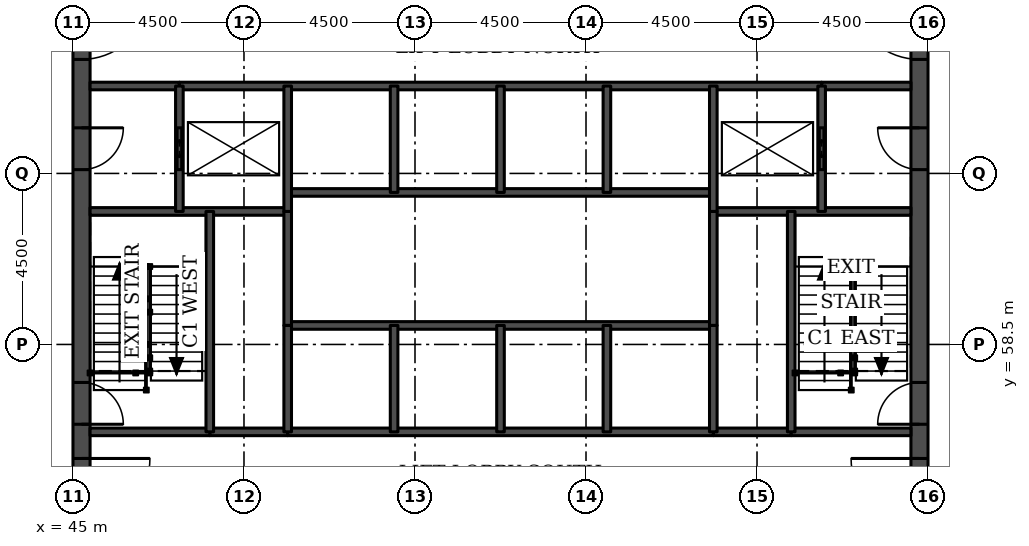
"""IFC4 building model, lengths in metres.
Left out: names, types, materials, properties, quantities, classifications, styles, units other than length and angle.
Written with IfcOpenShell. Run it as: python <this file> out.ifc"""

import sys

from ifc_helpers import new_model, si_unit, direction, frame, frame_2d, origin, place, context, subcontext, project, spatial, rectangle, extrude, element, fill, save


model = new_model("IFC4")
c1 = context("Model", 3, precision=1e-05, world=origin(), true_north=direction((0.0, 1.0)))
c2 = subcontext(c1, "Body", "Model", "MODEL_VIEW")
j1 = project(units=[si_unit("LENGTHUNIT", "METRE"), si_unit("PLANEANGLEUNIT", "RADIAN")], contexts=[c1])
p1 = place(None, origin())
s1 = spatial("IfcSite", under=j1, at=p1, CompositionType="ELEMENT")
p2 = place(p1, origin())
s2 = spatial("IfcBuilding", under=s1, at=p2, CompositionType="ELEMENT")
p3 = place(p2, frame((0.0, 0.0, 93.7)))
s3 = spatial("IfcBuildingStorey", under=s2, at=p3, CompositionType="ELEMENT", Elevation=93.7)
p4 = place(p3, frame((45.225, 49.5, 0.0), z_axis=(0.0, 0.0, 1.0), x_axis=(0.0, 1.0, 0.0)))
e1 = element("IfcWall", 1, at=p4, inside=s3, PredefinedType="SHEAR", context=c2, shape_type="SweptSolid", body=[
    extrude(rectangle(XDim=22.5, YDim=0.45, at=frame_2d((11.25, 0.0))), origin(), (0.0, 0.0, 1.0), 3.7),
])
p5 = place(p4, frame((4.2, 0.0, 0.0)))
e2 = element("IfcOpeningElement", 2, at=p5, cuts=e1, PredefinedType="OPENING", context=c2, shape_type="SweptSolid", body=[
    extrude(rectangle(XDim=1.8, YDim=2.1, at=frame_2d((0.9, 1.05))), frame((0.0, 0.235, 0.0), z_axis=(0.0, -1.0, 0.0), x_axis=(1.0, 0.0, 0.0)), (0.0, 0.0, 1.0), 0.47),
])
p6 = place(p4, frame((6.9, 0.0, 0.0)))
e3 = element("IfcOpeningElement", 3, at=p6, cuts=e1, PredefinedType="OPENING", context=c2, shape_type="SweptSolid", body=[
    extrude(rectangle(XDim=1.1, YDim=2.1, at=frame_2d((0.55, 1.05))), frame((0.0, 0.235, 0.0), z_axis=(0.0, -1.0, 0.0), x_axis=(1.0, 0.0, 0.0)), (0.0, 0.0, 1.0), 0.47),
])
p7 = place(p4, frame((13.6, 0.0, 0.0)))
e4 = element("IfcOpeningElement", 4, at=p7, cuts=e1, PredefinedType="OPENING", context=c2, shape_type="SweptSolid", body=[
    extrude(rectangle(XDim=1.1, YDim=2.1, at=frame_2d((0.55, 1.05))), frame((0.0, 0.235, 0.0), z_axis=(0.0, -1.0, 0.0), x_axis=(1.0, 0.0, 0.0)), (0.0, 0.0, 1.0), 0.47),
])
p8 = place(p4, frame((16.5, 0.0, 0.0)))
e5 = element("IfcOpeningElement", 5, at=p8, cuts=e1, PredefinedType="OPENING", context=c2, shape_type="SweptSolid", body=[
    extrude(rectangle(XDim=1.8, YDim=2.1, at=frame_2d((0.9, 1.05))), frame((0.0, 0.235, 0.0), z_axis=(0.0, -1.0, 0.0), x_axis=(1.0, 0.0, 0.0)), (0.0, 0.0, 1.0), 0.47),
])
p9 = place(p3, frame((67.275, 49.5, 0.0), z_axis=(0.0, 0.0, 1.0), x_axis=(0.0, 1.0, 0.0)))
e6 = element("IfcWall", 6, at=p9, inside=s3, PredefinedType="SHEAR", context=c2, shape_type="SweptSolid", body=[
    extrude(rectangle(XDim=22.5, YDim=0.45, at=frame_2d((11.25, 0.0))), origin(), (0.0, 0.0, 1.0), 3.7),
])
p10 = place(p9, frame((4.2, 0.0, 0.0)))
e7 = element("IfcOpeningElement", 7, at=p10, cuts=e6, PredefinedType="OPENING", context=c2, shape_type="SweptSolid", body=[
    extrude(rectangle(XDim=1.8, YDim=2.1, at=frame_2d((0.9, 1.05))), frame((0.0, 0.235, 0.0), z_axis=(0.0, -1.0, 0.0), x_axis=(1.0, 0.0, 0.0)), (0.0, 0.0, 1.0), 0.47),
])
p11 = place(p9, frame((6.9, 0.0, 0.0)))
e8 = element("IfcOpeningElement", 8, at=p11, cuts=e6, PredefinedType="OPENING", context=c2, shape_type="SweptSolid", body=[
    extrude(rectangle(XDim=1.1, YDim=2.1, at=frame_2d((0.55, 1.05))), frame((0.0, 0.235, 0.0), z_axis=(0.0, -1.0, 0.0), x_axis=(1.0, 0.0, 0.0)), (0.0, 0.0, 1.0), 0.47),
])
p12 = place(p9, frame((13.6, 0.0, 0.0)))
e9 = element("IfcOpeningElement", 9, at=p12, cuts=e6, PredefinedType="OPENING", context=c2, shape_type="SweptSolid", body=[
    extrude(rectangle(XDim=1.1, YDim=2.1, at=frame_2d((0.55, 1.05))), frame((0.0, 0.235, 0.0), z_axis=(0.0, -1.0, 0.0), x_axis=(1.0, 0.0, 0.0)), (0.0, 0.0, 1.0), 0.47),
])
p13 = place(p9, frame((16.5, 0.0, 0.0)))
e10 = element("IfcOpeningElement", 10, at=p13, cuts=e6, PredefinedType="OPENING", context=c2, shape_type="SweptSolid", body=[
    extrude(rectangle(XDim=1.8, YDim=2.1, at=frame_2d((0.9, 1.05))), frame((0.0, 0.235, 0.0), z_axis=(0.0, -1.0, 0.0), x_axis=(1.0, 0.0, 0.0)), (0.0, 0.0, 1.0), 0.47),
])
for number, where, z_axis, x_axis in (
    (11, (48.6, 56.2, 0.0), (0.0, 0.0, 1.0), (1.0, 0.0, 0.0)),
    (12, (61.85, 56.2, 0.0), (0.0, 0.0, 1.0), (1.0, 0.0, 0.0)),
):
    element("IfcWall", number, at=place(p3, frame(where, z_axis=z_axis, x_axis=x_axis)), inside=s3, PredefinedType="SOLIDWALL", context=c2, shape_type="SweptSolid", body=[
        extrude(rectangle(XDim=2.05, YDim=0.2, at=frame_2d((1.025, 0.0))), origin(), (0.0, 0.0, 1.0), 3.55),
    ])
p14 = place(p3, frame((45.45, 56.2, 0.0), z_axis=(0.0, 0.0, 1.0), x_axis=(1.0, 0.0, 0.0)))
e13 = element("IfcWall", 13, at=p14, inside=s3, PredefinedType="SOLIDWALL", context=c2, shape_type="SweptSolid", body=[
    extrude(rectangle(XDim=3.15, YDim=0.2, at=frame_2d((1.575, 0.0))), origin(), (0.0, 0.0, 1.0), 3.55),
])
p15 = place(p3, frame((50.65, 56.2, 0.0), z_axis=(0.0, 0.0, 1.0), x_axis=(1.0, 0.0, 0.0)))
e14 = element("IfcWall", 14, at=p15, inside=s3, PredefinedType="SOLIDWALL", context=c2, shape_type="SweptSolid", body=[
    extrude(rectangle(XDim=11.2, YDim=0.2, at=frame_2d((5.6, 0.0))), origin(), (0.0, 0.0, 1.0), 3.55),
])
p16 = place(p3, frame((63.9, 56.2, 0.0), z_axis=(0.0, 0.0, 1.0), x_axis=(1.0, 0.0, 0.0)))
e15 = element("IfcWall", 15, at=p16, inside=s3, PredefinedType="SOLIDWALL", context=c2, shape_type="SweptSolid", body=[
    extrude(rectangle(XDim=3.15, YDim=0.2, at=frame_2d((1.575, 0.0))), origin(), (0.0, 0.0, 1.0), 3.55),
])
p17 = place(p3, frame((50.65, 59.0, 0.0), z_axis=(0.0, 0.0, 1.0), x_axis=(1.0, 0.0, 0.0)))
e16 = element("IfcWall", 16, at=p17, inside=s3, PredefinedType="SOLIDWALL", context=c2, shape_type="SweptSolid", body=[
    extrude(rectangle(XDim=11.2, YDim=0.2, at=frame_2d((5.6, 0.0))), origin(), (0.0, 0.0, 1.0), 3.7),
])
for number, where, z_axis, x_axis in (
    (17, (45.45, 62.0, 0.0), (0.0, 0.0, 1.0), (1.0, 0.0, 0.0)),
    (18, (61.85, 62.0, 0.0), (0.0, 0.0, 1.0), (1.0, 0.0, 0.0)),
):
    element("IfcWall", number, at=place(p3, frame(where, z_axis=z_axis, x_axis=x_axis)), inside=s3, PredefinedType="SOLIDWALL", context=c2, shape_type="SweptSolid", body=[
        extrude(rectangle(XDim=5.2, YDim=0.2, at=frame_2d((2.6, 0.0))), origin(), (0.0, 0.0, 1.0), 3.55),
    ])
p18 = place(p3, frame((50.65, 62.5, 0.0), z_axis=(0.0, 0.0, 1.0), x_axis=(1.0, 0.0, 0.0)))
e19 = element("IfcWall", 19, at=p18, inside=s3, PredefinedType="SOLIDWALL", context=c2, shape_type="SweptSolid", body=[
    extrude(rectangle(XDim=11.2, YDim=0.2, at=frame_2d((5.6, 0.0))), origin(), (0.0, 0.0, 1.0), 3.7),
])
for number, where, z_axis, x_axis in (
    (20, (45.45, 65.3, 0.0), (0.0, 0.0, 1.0), (1.0, 0.0, 0.0)),
    (21, (64.7, 65.3, 0.0), (0.0, 0.0, 1.0), (1.0, 0.0, 0.0)),
):
    element("IfcWall", number, at=place(p3, frame(where, z_axis=z_axis, x_axis=x_axis)), inside=s3, PredefinedType="SOLIDWALL", context=c2, shape_type="SweptSolid", body=[
        extrude(rectangle(XDim=2.35, YDim=0.2, at=frame_2d((1.175, 0.0))), origin(), (0.0, 0.0, 1.0), 3.55),
    ])
p19 = place(p3, frame((47.8, 65.3, 0.0), z_axis=(0.0, 0.0, 1.0), x_axis=(1.0, 0.0, 0.0)))
e22 = element("IfcWall", 22, at=p19, inside=s3, PredefinedType="SOLIDWALL", context=c2, shape_type="SweptSolid", body=[
    extrude(rectangle(XDim=16.9, YDim=0.2, at=frame_2d((8.45, 0.0))), origin(), (0.0, 0.0, 1.0), 3.55),
])
p20 = place(p3, frame((47.8, 62.0, 0.0), z_axis=(0.0, 0.0, 1.0), x_axis=(0.0, 1.0, 0.0)))
e23 = element("IfcWall", 23, at=p20, inside=s3, PredefinedType="SOLIDWALL", context=c2, shape_type="SweptSolid", body=[
    extrude(rectangle(XDim=3.3, YDim=0.2, at=frame_2d((1.65, 0.0))), origin(), (0.0, 0.0, 1.0), 3.55),
])
p21 = place(p20, frame((1.1, 0.0, 0.0)))
e24 = element("IfcOpeningElement", 24, at=p21, cuts=e23, PredefinedType="OPENING", context=c2, shape_type="SweptSolid", body=[
    extrude(rectangle(XDim=1.1, YDim=2.1, at=frame_2d((0.55, 1.05))), frame((0.0, 0.11, 0.0), z_axis=(0.0, -1.0, 0.0), x_axis=(1.0, 0.0, 0.0)), (0.0, 0.0, 1.0), 0.22),
])
p22 = place(p3, frame((48.6, 56.2, 0.0), z_axis=(0.0, 0.0, 1.0), x_axis=(0.0, 1.0, 0.0)))
e25 = element("IfcWall", 25, at=p22, inside=s3, PredefinedType="SOLIDWALL", context=c2, shape_type="SweptSolid", body=[
    extrude(rectangle(XDim=5.8, YDim=0.2, at=frame_2d((2.9, 0.0))), origin(), (0.0, 0.0, 1.0), 3.55),
])
p23 = place(p3, frame((50.65, 59.0, 0.0), z_axis=(0.0, 0.0, 1.0), x_axis=(0.0, 1.0, 0.0)))
e26 = element("IfcWall", 26, at=p23, inside=s3, PredefinedType="SOLIDWALL", context=c2, shape_type="SweptSolid", body=[
    extrude(rectangle(XDim=3.0, YDim=0.2, at=frame_2d((1.5, 0.0))), origin(), (0.0, 0.0, 1.0), 3.7),
])
p24 = place(p3, frame((50.65, 56.2, 0.0), z_axis=(0.0, 0.0, 1.0), x_axis=(0.0, 1.0, 0.0)))
e27 = element("IfcWall", 27, at=p24, inside=s3, PredefinedType="SOLIDWALL", context=c2, shape_type="SweptSolid", body=[
    extrude(rectangle(XDim=2.8, YDim=0.2, at=frame_2d((1.4, 0.0))), origin(), (0.0, 0.0, 1.0), 3.55),
])
p25 = place(p3, frame((50.65, 62.0, 0.0), z_axis=(0.0, 0.0, 1.0), x_axis=(0.0, 1.0, 0.0)))
e28 = element("IfcWall", 28, at=p25, inside=s3, PredefinedType="SOLIDWALL", context=c2, shape_type="SweptSolid", body=[
    extrude(rectangle(XDim=3.3, YDim=0.2, at=frame_2d((1.65, 0.0))), origin(), (0.0, 0.0, 1.0), 3.55),
])
for number, where, z_axis, x_axis in (
    (29, (53.45, 56.2, 0.0), (0.0, 0.0, 1.0), (0.0, 1.0, 0.0)),
    (30, (53.45, 62.5, 0.0), (0.0, 0.0, 1.0), (0.0, 1.0, 0.0)),
    (31, (56.25, 56.2, 0.0), (0.0, 0.0, 1.0), (0.0, 1.0, 0.0)),
    (32, (56.25, 62.5, 0.0), (0.0, 0.0, 1.0), (0.0, 1.0, 0.0)),
    (33, (59.05, 56.2, 0.0), (0.0, 0.0, 1.0), (0.0, 1.0, 0.0)),
    (34, (59.05, 62.5, 0.0), (0.0, 0.0, 1.0), (0.0, 1.0, 0.0)),
):
    element("IfcWall", number, at=place(p3, frame(where, z_axis=z_axis, x_axis=x_axis)), inside=s3, PredefinedType="SOLIDWALL", context=c2, shape_type="SweptSolid", body=[
        extrude(rectangle(XDim=2.8, YDim=0.2, at=frame_2d((1.4, 0.0))), origin(), (0.0, 0.0, 1.0), 3.55),
    ])
p26 = place(p3, frame((61.85, 59.0, 0.0), z_axis=(0.0, 0.0, 1.0), x_axis=(0.0, 1.0, 0.0)))
e35 = element("IfcWall", 35, at=p26, inside=s3, PredefinedType="SOLIDWALL", context=c2, shape_type="SweptSolid", body=[
    extrude(rectangle(XDim=3.0, YDim=0.2, at=frame_2d((1.5, 0.0))), origin(), (0.0, 0.0, 1.0), 3.7),
])
p27 = place(p3, frame((61.85, 56.2, 0.0), z_axis=(0.0, 0.0, 1.0), x_axis=(0.0, 1.0, 0.0)))
e36 = element("IfcWall", 36, at=p27, inside=s3, PredefinedType="SOLIDWALL", context=c2, shape_type="SweptSolid", body=[
    extrude(rectangle(XDim=2.8, YDim=0.2, at=frame_2d((1.4, 0.0))), origin(), (0.0, 0.0, 1.0), 3.55),
])
p28 = place(p3, frame((61.85, 62.0, 0.0), z_axis=(0.0, 0.0, 1.0), x_axis=(0.0, 1.0, 0.0)))
e37 = element("IfcWall", 37, at=p28, inside=s3, PredefinedType="SOLIDWALL", context=c2, shape_type="SweptSolid", body=[
    extrude(rectangle(XDim=3.3, YDim=0.2, at=frame_2d((1.65, 0.0))), origin(), (0.0, 0.0, 1.0), 3.55),
])
p29 = place(p3, frame((63.9, 56.2, 0.0), z_axis=(0.0, 0.0, 1.0), x_axis=(0.0, 1.0, 0.0)))
e38 = element("IfcWall", 38, at=p29, inside=s3, PredefinedType="SOLIDWALL", context=c2, shape_type="SweptSolid", body=[
    extrude(rectangle(XDim=5.8, YDim=0.2, at=frame_2d((2.9, 0.0))), origin(), (0.0, 0.0, 1.0), 3.55),
])
p30 = place(p3, frame((64.7, 62.0, 0.0), z_axis=(0.0, 0.0, 1.0), x_axis=(0.0, 1.0, 0.0)))
e39 = element("IfcWall", 39, at=p30, inside=s3, PredefinedType="SOLIDWALL", context=c2, shape_type="SweptSolid", body=[
    extrude(rectangle(XDim=3.3, YDim=0.2, at=frame_2d((1.65, 0.0))), origin(), (0.0, 0.0, 1.0), 3.55),
])
p31 = place(p30, frame((1.1, 0.0, 0.0)))
e40 = element("IfcOpeningElement", 40, at=p31, cuts=e39, PredefinedType="OPENING", context=c2, shape_type="SweptSolid", body=[
    extrude(rectangle(XDim=1.1, YDim=2.1, at=frame_2d((0.55, 1.05))), frame((0.0, 0.11, 0.0), z_axis=(0.0, -1.0, 0.0), x_axis=(1.0, 0.0, 0.0)), (0.0, 0.0, 1.0), 0.22),
])
p32 = place(p21, origin())
e41 = element("IfcDoor", 41, at=p32, inside=s3, OperationType="DOUBLE_DOOR_SLIDING", PredefinedType="DOOR", context=c2, shape_type="SweptSolid", body=[
    extrude(rectangle(XDim=1.1, YDim=2.1, at=frame_2d((0.55, 1.05))), frame((0.0, 0.025, 0.0), z_axis=(0.0, -1.0, 0.0), x_axis=(1.0, 0.0, 0.0)), (0.0, 0.0, 1.0), 0.05),
])
fill(e24, e41)
p33 = place(p31, origin())
e42 = element("IfcDoor", 42, at=p33, inside=s3, OperationType="DOUBLE_DOOR_SLIDING", PredefinedType="DOOR", context=c2, shape_type="SweptSolid", body=[
    extrude(rectangle(XDim=1.1, YDim=2.1, at=frame_2d((0.55, 1.05))), frame((0.0, 0.025, 0.0), z_axis=(0.0, -1.0, 0.0), x_axis=(1.0, 0.0, 0.0)), (0.0, 0.0, 1.0), 0.05),
])
fill(e40, e42)
p34 = place(p5, frame((1.8, 0.0, 0.0), z_axis=(0.0, 0.0, 1.0), x_axis=(-1.0, 0.0, 0.0)))
e43 = element("IfcDoor", 43, at=p34, inside=s3, OperationType="SINGLE_SWING_LEFT", PredefinedType="DOOR", context=c2, shape_type="SweptSolid", body=[
    extrude(rectangle(XDim=1.8, YDim=2.1, at=frame_2d((0.9, 1.05))), frame((0.0, 0.025, 0.0), z_axis=(0.0, -1.0, 0.0), x_axis=(1.0, 0.0, 0.0)), (0.0, 0.0, 1.0), 0.05),
])
fill(e2, e43)
p35 = place(p6, frame((1.1, 0.0, 0.0), z_axis=(0.0, 0.0, 1.0), x_axis=(-1.0, 0.0, 0.0)))
e44 = element("IfcDoor", 44, at=p35, inside=s3, OperationType="SINGLE_SWING_RIGHT", PredefinedType="DOOR", context=c2, shape_type="SweptSolid", body=[
    extrude(rectangle(XDim=1.1, YDim=2.1, at=frame_2d((0.55, 1.05))), frame((0.0, 0.025, 0.0), z_axis=(0.0, -1.0, 0.0), x_axis=(1.0, 0.0, 0.0)), (0.0, 0.0, 1.0), 0.05),
])
fill(e3, e44)
p36 = place(p7, frame((1.1, 0.0, 0.0), z_axis=(0.0, 0.0, 1.0), x_axis=(-1.0, 0.0, 0.0)))
e45 = element("IfcDoor", 45, at=p36, inside=s3, OperationType="SINGLE_SWING_LEFT", PredefinedType="DOOR", context=c2, shape_type="SweptSolid", body=[
    extrude(rectangle(XDim=1.1, YDim=2.1, at=frame_2d((0.55, 1.05))), frame((0.0, 0.025, 0.0), z_axis=(0.0, -1.0, 0.0), x_axis=(1.0, 0.0, 0.0)), (0.0, 0.0, 1.0), 0.05),
])
fill(e4, e45)
p37 = place(p8, frame((1.8, 0.0, 0.0), z_axis=(0.0, 0.0, 1.0), x_axis=(-1.0, 0.0, 0.0)))
e46 = element("IfcDoor", 46, at=p37, inside=s3, OperationType="SINGLE_SWING_LEFT", PredefinedType="DOOR", context=c2, shape_type="SweptSolid", body=[
    extrude(rectangle(XDim=1.8, YDim=2.1, at=frame_2d((0.9, 1.05))), frame((0.0, 0.025, 0.0), z_axis=(0.0, -1.0, 0.0), x_axis=(1.0, 0.0, 0.0)), (0.0, 0.0, 1.0), 0.05),
])
fill(e5, e46)
p38 = place(p10, origin())
e47 = element("IfcDoor", 47, at=p38, inside=s3, OperationType="SINGLE_SWING_RIGHT", PredefinedType="DOOR", context=c2, shape_type="SweptSolid", body=[
    extrude(rectangle(XDim=1.8, YDim=2.1, at=frame_2d((0.9, 1.05))), frame((0.0, 0.025, 0.0), z_axis=(0.0, -1.0, 0.0), x_axis=(1.0, 0.0, 0.0)), (0.0, 0.0, 1.0), 0.05),
])
fill(e7, e47)
p39 = place(p11, origin())
e48 = element("IfcDoor", 48, at=p39, inside=s3, OperationType="SINGLE_SWING_LEFT", PredefinedType="DOOR", context=c2, shape_type="SweptSolid", body=[
    extrude(rectangle(XDim=1.1, YDim=2.1, at=frame_2d((0.55, 1.05))), frame((0.0, 0.025, 0.0), z_axis=(0.0, -1.0, 0.0), x_axis=(1.0, 0.0, 0.0)), (0.0, 0.0, 1.0), 0.05),
])
fill(e8, e48)
p40 = place(p12, origin())
e49 = element("IfcDoor", 49, at=p40, inside=s3, OperationType="SINGLE_SWING_RIGHT", PredefinedType="DOOR", context=c2, shape_type="SweptSolid", body=[
    extrude(rectangle(XDim=1.1, YDim=2.1, at=frame_2d((0.55, 1.05))), frame((0.0, 0.025, 0.0), z_axis=(0.0, -1.0, 0.0), x_axis=(1.0, 0.0, 0.0)), (0.0, 0.0, 1.0), 0.05),
])
fill(e9, e49)
p41 = place(p13, origin())
e50 = element("IfcDoor", 50, at=p41, inside=s3, OperationType="SINGLE_SWING_RIGHT", PredefinedType="DOOR", context=c2, shape_type="SweptSolid", body=[
    extrude(rectangle(XDim=1.8, YDim=2.1, at=frame_2d((0.9, 1.05))), frame((0.0, 0.025, 0.0), z_axis=(0.0, -1.0, 0.0), x_axis=(1.0, 0.0, 0.0)), (0.0, 0.0, 1.0), 0.05),
])
fill(e10, e50)
save(model, sys.argv[1])
